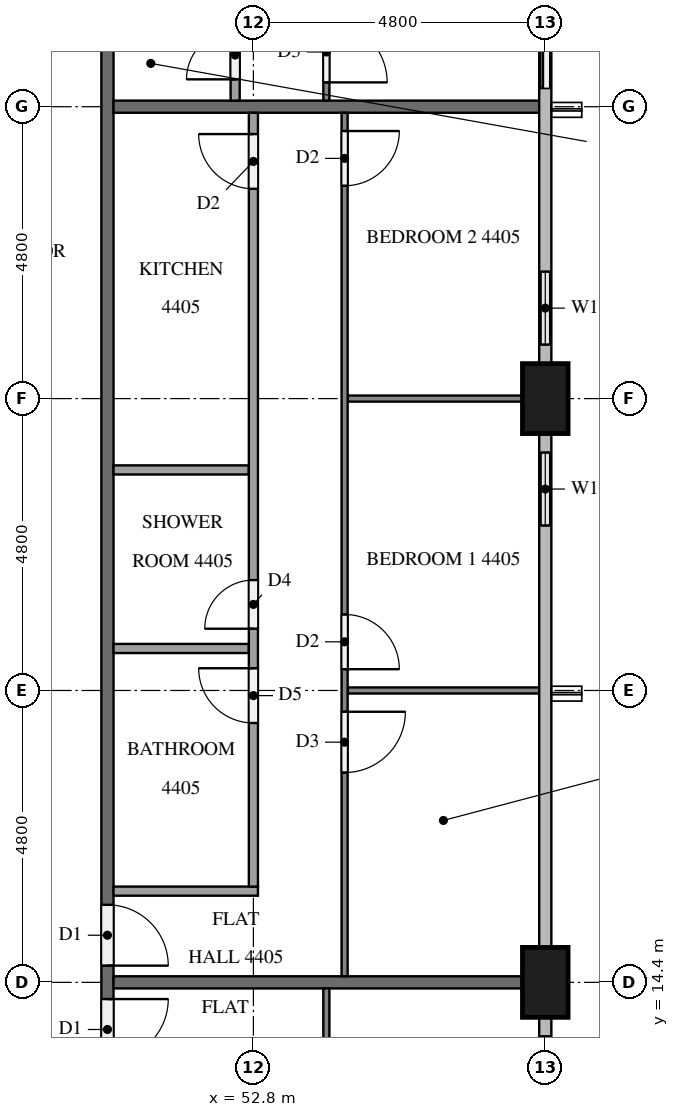
"""IFC4 building model, lengths in metres.
Left out: names, types, materials, properties, quantities, classifications, styles, units other than length and angle.
Written with IfcOpenShell. Run it as: python <this file> out.ifc"""

import sys

from ifc_helpers import new_model, si_unit, direction, frame, frame_2d, origin, origin_2d, place, context, subcontext, project, spatial, rectangle, extrude, element, fill, save


model = new_model("IFC4")
c1 = context("Model", 3, precision=1e-05, world=origin(), true_north=direction((0.0, 1.0)))
c2 = subcontext(c1, "Body", "Model", "MODEL_VIEW")
j1 = project(units=[si_unit("LENGTHUNIT", "METRE"), si_unit("PLANEANGLEUNIT", "RADIAN")], contexts=[c1])
p1 = place(None, origin())
s1 = spatial("IfcSite", under=j1, at=p1, CompositionType="ELEMENT")
p2 = place(p1, origin())
s2 = spatial("IfcBuilding", under=s1, at=p2, CompositionType="ELEMENT")
p3 = place(p2, frame((0.0, 0.0, 170.0)))
s3 = spatial("IfcBuildingStorey", under=s2, at=p3, CompositionType="ELEMENT", Elevation=170.0)
for number, where, z_axis, x_axis in (
    (1, (57.6, 14.4, 0.0), (0.0, 0.0, 1.0), (0.0, 1.0, 0.0)),
    (2, (57.6, 24.0, 0.0), (0.0, 0.0, 1.0), (0.0, 1.0, 0.0)),
):
    element("IfcColumn", number, at=place(p3, frame(where, z_axis=z_axis, x_axis=x_axis)), inside=s3, PredefinedType="COLUMN", context=c2, shape_type="SweptSolid", body=[
        extrude(rectangle(XDim=1.15, YDim=0.75, at=origin_2d()), origin(), (0.0, 0.0, 1.0), 3.1),
    ])
p4 = place(p3, frame((57.6, 12.0, 0.0), z_axis=(0.0, 0.0, 1.0), x_axis=(0.0, 1.0, 0.0)))
e3 = element("IfcWall", 3, at=p4, inside=s3, PredefinedType="SOLIDWALL", context=c2, shape_type="SweptSolid", body=[
    extrude(rectangle(XDim=1.825, YDim=0.15, at=frame_2d((0.913, 0.0))), origin(), (0.0, 0.0, 1.0), 3.1),
])
p5 = place(p4, frame((0.312, 0.0, 0.9)))
e4 = element("IfcOpeningElement", 4, at=p5, cuts=e3, PredefinedType="OPENING", context=c2, shape_type="SweptSolid", body=[
    extrude(rectangle(XDim=1.2, YDim=1.4, at=frame_2d((0.6, 0.7))), frame((0.0, 0.085, 0.0), z_axis=(0.0, -1.0, 0.0), x_axis=(1.0, 0.0, 0.0)), (0.0, 0.0, 1.0), 0.17),
])
p6 = place(p3, frame((57.6, 21.6, 0.0), z_axis=(0.0, 0.0, 1.0), x_axis=(0.0, 1.0, 0.0)))
e5 = element("IfcWall", 5, at=p6, inside=s3, PredefinedType="SOLIDWALL", context=c2, shape_type="SweptSolid", body=[
    extrude(rectangle(XDim=1.825, YDim=0.15, at=frame_2d((0.913, 0.0))), origin(), (0.0, 0.0, 1.0), 3.1),
])
p7 = place(p6, frame((0.312, 0.0, 0.9)))
e6 = element("IfcOpeningElement", 6, at=p7, cuts=e5, PredefinedType="OPENING", context=c2, shape_type="SweptSolid", body=[
    extrude(rectangle(XDim=1.2, YDim=1.4, at=frame_2d((0.6, 0.7))), frame((0.0, 0.085, 0.0), z_axis=(0.0, -1.0, 0.0), x_axis=(1.0, 0.0, 0.0)), (0.0, 0.0, 1.0), 0.17),
])
p8 = place(p3, frame((57.6, 24.575, 0.0), z_axis=(0.0, 0.0, 1.0), x_axis=(0.0, 1.0, 0.0)))
e7 = element("IfcWall", 7, at=p8, inside=s3, PredefinedType="SOLIDWALL", context=c2, shape_type="SweptSolid", body=[
    extrude(rectangle(XDim=1.825, YDim=0.15, at=frame_2d((0.913, 0.0))), origin(), (0.0, 0.0, 1.0), 3.1),
])
p9 = place(p8, frame((0.312, 0.0, 0.9)))
e8 = element("IfcOpeningElement", 8, at=p9, cuts=e7, PredefinedType="OPENING", context=c2, shape_type="SweptSolid", body=[
    extrude(rectangle(XDim=1.2, YDim=1.4, at=frame_2d((0.6, 0.7))), frame((0.0, 0.085, 0.0), z_axis=(0.0, -1.0, 0.0), x_axis=(1.0, 0.0, 0.0)), (0.0, 0.0, 1.0), 0.17),
])
p10 = place(p3, frame((57.6, 28.8, 0.0), z_axis=(0.0, 0.0, 1.0), x_axis=(0.0, 1.0, 0.0)))
e9 = element("IfcWall", 9, at=p10, inside=s3, PredefinedType="SOLIDWALL", context=c2, shape_type="SweptSolid", body=[
    extrude(rectangle(XDim=2.4, YDim=0.15, at=frame_2d((1.2, 0.0))), origin(), (0.0, 0.0, 1.0), 3.1),
])
p11 = place(p10, frame((0.3, 0.0, 0.0)))
e10 = element("IfcOpeningElement", 10, at=p11, cuts=e9, PredefinedType="OPENING", context=c2, shape_type="SweptSolid", body=[
    extrude(rectangle(XDim=1.8, YDim=2.4, at=frame_2d((0.9, 1.2))), frame((0.0, 0.085, 0.0), z_axis=(0.0, -1.0, 0.0), x_axis=(1.0, 0.0, 0.0)), (0.0, 0.0, 1.0), 0.17),
])
p12 = place(p3, frame((50.4, 40.7, 0.0), z_axis=(0.0, 0.0, 1.0), x_axis=(0.0, -1.0, 0.0)))
e11 = element("IfcWall", 11, at=p12, inside=s3, PredefinedType="PARTITIONING", context=c2, shape_type="SweptSolid", body=[
    extrude(rectangle(XDim=28.6, YDim=0.2, at=frame_2d((14.3, 0.0))), origin(), (0.0, 0.0, 1.0), 3.1),
])
p13 = place(p12, frame((26.575, 0.0, 0.0)))
e12 = element("IfcOpeningElement", 12, at=p13, cuts=e11, PredefinedType="OPENING", context=c2, shape_type="SweptSolid", body=[
    extrude(rectangle(XDim=1.0, YDim=2.1, at=frame_2d((0.5, 1.05))), frame((0.0, 0.11, 0.0), z_axis=(0.0, -1.0, 0.0), x_axis=(1.0, 0.0, 0.0)), (0.0, 0.0, 1.0), 0.22),
])
p14 = place(p12, frame((25.025, 0.0, 0.0)))
e13 = element("IfcOpeningElement", 13, at=p14, cuts=e11, PredefinedType="OPENING", context=c2, shape_type="SweptSolid", body=[
    extrude(rectangle(XDim=1.0, YDim=2.1, at=frame_2d((0.5, 1.05))), frame((0.0, 0.11, 0.0), z_axis=(0.0, -1.0, 0.0), x_axis=(1.0, 0.0, 0.0)), (0.0, 0.0, 1.0), 0.22),
])
p15 = place(p12, frame((4.975, 0.0, 0.0)))
e14 = element("IfcOpeningElement", 14, at=p15, cuts=e11, PredefinedType="OPENING", context=c2, shape_type="SweptSolid", body=[
    extrude(rectangle(XDim=1.0, YDim=2.1, at=frame_2d((0.5, 1.05))), frame((0.0, 0.11, 0.0), z_axis=(0.0, -1.0, 0.0), x_axis=(1.0, 0.0, 0.0)), (0.0, 0.0, 1.0), 0.22),
])
p16 = place(p12, frame((3.425, 0.0, 0.0)))
e15 = element("IfcOpeningElement", 15, at=p16, cuts=e11, PredefinedType="OPENING", context=c2, shape_type="SweptSolid", body=[
    extrude(rectangle(XDim=1.0, YDim=2.1, at=frame_2d((0.5, 1.05))), frame((0.0, 0.11, 0.0), z_axis=(0.0, -1.0, 0.0), x_axis=(1.0, 0.0, 0.0)), (0.0, 0.0, 1.0), 0.22),
])
p17 = place(p3, frame((50.5, 14.4, 0.0), z_axis=(0.0, 0.0, 1.0), x_axis=(1.0, 0.0, 0.0)))
e16 = element("IfcWall", 16, at=p17, inside=s3, PredefinedType="PARTITIONING", context=c2, shape_type="SweptSolid", body=[
    extrude(rectangle(XDim=6.725, YDim=0.2, at=frame_2d((3.363, 0.0))), origin(), (0.0, 0.0, 1.0), 3.1),
])
p18 = place(p3, frame((50.5, 28.8, 0.0), z_axis=(0.0, 0.0, 1.0), x_axis=(1.0, 0.0, 0.0)))
e17 = element("IfcWall", 17, at=p18, inside=s3, PredefinedType="PARTITIONING", context=c2, shape_type="SweptSolid", body=[
    extrude(rectangle(XDim=7.0, YDim=0.2, at=frame_2d((3.5, 0.0))), origin(), (0.0, 0.0, 1.0), 3.1),
])
p19 = place(p3, frame((54.0, 14.3, 0.0), z_axis=(0.0, 0.0, 1.0), x_axis=(0.0, -1.0, 0.0)))
e18 = element("IfcWall", 18, at=p19, inside=s3, PredefinedType="PARTITIONING", context=c2, shape_type="SweptSolid", body=[
    extrude(rectangle(XDim=13.879, YDim=0.1, at=frame_2d((6.939, 0.0))), origin(), (0.0, 0.0, 1.0), 3.1),
])
p20 = place(p19, frame((3.45, 0.0, 0.0)))
e19 = element("IfcOpeningElement", 19, at=p20, cuts=e18, PredefinedType="OPENING", context=c2, shape_type="SweptSolid", body=[
    extrude(rectangle(XDim=0.9, YDim=2.1, at=frame_2d((0.45, 1.05))), frame((0.0, 0.06, 0.0), z_axis=(0.0, -1.0, 0.0), x_axis=(1.0, 0.0, 0.0)), (0.0, 0.0, 1.0), 0.12),
])
p21 = place(p19, frame((5.05, 0.0, 0.0)))
e20 = element("IfcOpeningElement", 20, at=p21, cuts=e18, PredefinedType="OPENING", context=c2, shape_type="SweptSolid", body=[
    extrude(rectangle(XDim=1.0, YDim=2.1, at=frame_2d((0.5, 1.05))), frame((0.0, 0.06, 0.0), z_axis=(0.0, -1.0, 0.0), x_axis=(1.0, 0.0, 0.0)), (0.0, 0.0, 1.0), 0.12),
])
p22 = place(p19, frame((12.678, 0.0, 0.0)))
e21 = element("IfcOpeningElement", 21, at=p22, cuts=e18, PredefinedType="OPENING", context=c2, shape_type="SweptSolid", body=[
    extrude(rectangle(XDim=0.9, YDim=2.1, at=frame_2d((0.45, 1.05))), frame((0.0, 0.06, 0.0), z_axis=(0.0, -1.0, 0.0), x_axis=(1.0, 0.0, 0.0)), (0.0, 0.0, 1.0), 0.12),
])
p23 = place(p3, frame((54.35, 19.2, 0.0), z_axis=(0.0, 0.0, 1.0), x_axis=(1.0, 0.0, 0.0)))
e22 = element("IfcWall", 22, at=p23, inside=s3, PredefinedType="PARTITIONING", context=c2, shape_type="SweptSolid", body=[
    extrude(rectangle(XDim=3.15, YDim=0.1, at=frame_2d((1.575, 0.0))), origin(), (0.0, 0.0, 1.0), 3.1),
])
p24 = place(p3, frame((54.35, 24.0, 0.0), z_axis=(0.0, 0.0, 1.0), x_axis=(1.0, 0.0, 0.0)))
e23 = element("IfcWall", 23, at=p24, inside=s3, PredefinedType="PARTITIONING", context=c2, shape_type="SweptSolid", body=[
    extrude(rectangle(XDim=2.875, YDim=0.1, at=frame_2d((1.438, 0.0))), origin(), (0.0, 0.0, 1.0), 3.1),
])
p25 = place(p3, frame((54.3, 28.7, 0.0), z_axis=(0.0, 0.0, 1.0), x_axis=(0.0, -1.0, 0.0)))
e24 = element("IfcWall", 24, at=p25, inside=s3, PredefinedType="PARTITIONING", context=c2, shape_type="SweptSolid", body=[
    extrude(rectangle(XDim=14.2, YDim=0.1, at=frame_2d((7.1, 0.0))), origin(), (0.0, 0.0, 1.0), 3.1),
])
p26 = place(p25, frame((9.85, 0.0, 0.0)))
e25 = element("IfcOpeningElement", 25, at=p26, cuts=e24, PredefinedType="OPENING", context=c2, shape_type="SweptSolid", body=[
    extrude(rectangle(XDim=1.0, YDim=2.1, at=frame_2d((0.5, 1.05))), frame((0.0, 0.06, 0.0), z_axis=(0.0, -1.0, 0.0), x_axis=(1.0, 0.0, 0.0)), (0.0, 0.0, 1.0), 0.12),
])
p27 = place(p25, frame((8.25, 0.0, 0.0)))
e26 = element("IfcOpeningElement", 26, at=p27, cuts=e24, PredefinedType="OPENING", context=c2, shape_type="SweptSolid", body=[
    extrude(rectangle(XDim=0.9, YDim=2.1, at=frame_2d((0.45, 1.05))), frame((0.0, 0.06, 0.0), z_axis=(0.0, -1.0, 0.0), x_axis=(1.0, 0.0, 0.0)), (0.0, 0.0, 1.0), 0.12),
])
p28 = place(p25, frame((0.3, 0.0, 0.0)))
e27 = element("IfcOpeningElement", 27, at=p28, cuts=e24, PredefinedType="OPENING", context=c2, shape_type="SweptSolid", body=[
    extrude(rectangle(XDim=0.9, YDim=2.1, at=frame_2d((0.45, 1.05))), frame((0.0, 0.06, 0.0), z_axis=(0.0, -1.0, 0.0), x_axis=(1.0, 0.0, 0.0)), (0.0, 0.0, 1.0), 0.12),
])
for number, where, z_axis, x_axis in (
    (28, (50.5, 19.89, 0.0), (0.0, 0.0, 1.0), (1.0, 0.0, 0.0)),
    (29, (50.5, 22.827, 0.0), (0.0, 0.0, 1.0), (1.0, 0.0, 0.0)),
):
    element("IfcWall", number, at=place(p3, frame(where, z_axis=z_axis, x_axis=x_axis)), inside=s3, PredefinedType="PARTITIONING", context=c2, shape_type="SweptSolid", body=[
        extrude(rectangle(XDim=2.225, YDim=0.15, at=frame_2d((1.113, 0.0))), origin(), (0.0, 0.0, 1.0), 3.1),
    ])
p29 = place(p3, frame((50.5, 15.9, 0.0), z_axis=(0.0, 0.0, 1.0), x_axis=(1.0, 0.0, 0.0)))
e30 = element("IfcWall", 30, at=p29, inside=s3, PredefinedType="PARTITIONING", context=c2, shape_type="SweptSolid", body=[
    extrude(rectangle(XDim=2.375, YDim=0.15, at=frame_2d((1.188, 0.0))), origin(), (0.0, 0.0, 1.0), 3.1),
])
p30 = place(p3, frame((52.8, 15.975, 0.0), z_axis=(0.0, 0.0, 1.0), x_axis=(0.0, 1.0, 0.0)))
e31 = element("IfcWall", 31, at=p30, inside=s3, PredefinedType="PARTITIONING", context=c2, shape_type="SweptSolid", body=[
    extrude(rectangle(XDim=12.725, YDim=0.15, at=frame_2d((6.362, 0.0))), origin(), (0.0, 0.0, 1.0), 3.1),
])
p31 = place(p30, frame((2.69, 0.0, 0.0)))
e32 = element("IfcOpeningElement", 32, at=p31, cuts=e31, PredefinedType="OPENING", context=c2, shape_type="SweptSolid", body=[
    extrude(rectangle(XDim=0.9, YDim=2.1, at=frame_2d((0.45, 1.05))), frame((0.0, 0.085, 0.0), z_axis=(0.0, -1.0, 0.0), x_axis=(1.0, 0.0, 0.0)), (0.0, 0.0, 1.0), 0.17),
])
p32 = place(p30, frame((4.24, 0.0, 0.0)))
e33 = element("IfcOpeningElement", 33, at=p32, cuts=e31, PredefinedType="OPENING", context=c2, shape_type="SweptSolid", body=[
    extrude(rectangle(XDim=0.8, YDim=2.1, at=frame_2d((0.4, 1.05))), frame((0.0, 0.085, 0.0), z_axis=(0.0, -1.0, 0.0), x_axis=(1.0, 0.0, 0.0)), (0.0, 0.0, 1.0), 0.17),
])
p33 = place(p30, frame((11.475, 0.0, 0.0)))
e34 = element("IfcOpeningElement", 34, at=p33, cuts=e31, PredefinedType="OPENING", context=c2, shape_type="SweptSolid", body=[
    extrude(rectangle(XDim=0.9, YDim=2.1, at=frame_2d((0.45, 1.05))), frame((0.0, 0.085, 0.0), z_axis=(0.0, -1.0, 0.0), x_axis=(1.0, 0.0, 0.0)), (0.0, 0.0, 1.0), 0.17),
])
p34 = place(p3, frame((54.0, 35.9, 0.0), z_axis=(0.0, 0.0, 1.0), x_axis=(0.0, -1.0, 0.0)))
e35 = element("IfcWall", 35, at=p34, inside=s3, PredefinedType="PARTITIONING", context=c2, shape_type="SweptSolid", body=[
    extrude(rectangle(XDim=7.0, YDim=0.1, at=frame_2d((3.5, 0.0))), origin(), (0.0, 0.0, 1.0), 3.1),
])
p35 = place(p34, frame((5.7, 0.0, 0.0)))
e36 = element("IfcOpeningElement", 36, at=p35, cuts=e35, PredefinedType="OPENING", context=c2, shape_type="SweptSolid", body=[
    extrude(rectangle(XDim=1.0, YDim=2.1, at=frame_2d((0.5, 1.05))), frame((0.0, 0.06, 0.0), z_axis=(0.0, -1.0, 0.0), x_axis=(1.0, 0.0, 0.0)), (0.0, 0.0, 1.0), 0.12),
])
p36 = place(p3, frame((52.5, 28.9, 0.0), z_axis=(0.0, 0.0, 1.0), x_axis=(0.0, 1.0, 0.0)))
e37 = element("IfcWall", 37, at=p36, inside=s3, PredefinedType="PARTITIONING", context=c2, shape_type="SweptSolid", body=[
    extrude(rectangle(XDim=5.525, YDim=0.15, at=frame_2d((2.763, 0.0))), origin(), (0.0, 0.0, 1.0), 3.1),
])
p37 = place(p36, frame((4.325, 0.0, 0.0)))
e38 = element("IfcOpeningElement", 38, at=p37, cuts=e37, PredefinedType="OPENING", context=c2, shape_type="SweptSolid", body=[
    extrude(rectangle(XDim=0.9, YDim=2.1, at=frame_2d((0.45, 1.05))), frame((0.0, 0.085, 0.0), z_axis=(0.0, -1.0, 0.0), x_axis=(1.0, 0.0, 0.0)), (0.0, 0.0, 1.0), 0.17),
])
p38 = place(p36, frame((0.35, 0.0, 0.0)))
e39 = element("IfcOpeningElement", 39, at=p38, cuts=e37, PredefinedType="OPENING", context=c2, shape_type="SweptSolid", body=[
    extrude(rectangle(XDim=0.8, YDim=2.1, at=frame_2d((0.4, 1.05))), frame((0.0, 0.085, 0.0), z_axis=(0.0, -1.0, 0.0), x_axis=(1.0, 0.0, 0.0)), (0.0, 0.0, 1.0), 0.17),
])
p39 = place(p5, origin())
e40 = element("IfcWindow", 40, at=p39, inside=s3, PartitioningType="SINGLE_PANEL", PredefinedType="WINDOW", context=c2, shape_type="SweptSolid", body=[
    extrude(rectangle(XDim=1.2, YDim=1.4, at=frame_2d((0.6, 0.7))), frame((0.0, 0.03, 0.0), z_axis=(0.0, -1.0, 0.0), x_axis=(1.0, 0.0, 0.0)), (0.0, 0.0, 1.0), 0.06),
])
fill(e4, e40)
p40 = place(p7, origin())
e41 = element("IfcWindow", 41, at=p40, inside=s3, PartitioningType="SINGLE_PANEL", PredefinedType="WINDOW", context=c2, shape_type="SweptSolid", body=[
    extrude(rectangle(XDim=1.2, YDim=1.4, at=frame_2d((0.6, 0.7))), frame((0.0, 0.03, 0.0), z_axis=(0.0, -1.0, 0.0), x_axis=(1.0, 0.0, 0.0)), (0.0, 0.0, 1.0), 0.06),
])
fill(e6, e41)
p41 = place(p9, origin())
e42 = element("IfcWindow", 42, at=p41, inside=s3, PartitioningType="SINGLE_PANEL", PredefinedType="WINDOW", context=c2, shape_type="SweptSolid", body=[
    extrude(rectangle(XDim=1.2, YDim=1.4, at=frame_2d((0.6, 0.7))), frame((0.0, 0.03, 0.0), z_axis=(0.0, -1.0, 0.0), x_axis=(1.0, 0.0, 0.0)), (0.0, 0.0, 1.0), 0.06),
])
fill(e8, e42)
p42 = place(p11, origin())
e43 = element("IfcDoor", 43, at=p42, inside=s3, OperationType="SLIDING_TO_RIGHT", PredefinedType="DOOR", context=c2, shape_type="SweptSolid", body=[
    extrude(rectangle(XDim=1.8, YDim=2.4, at=frame_2d((0.9, 1.2))), frame((0.0, 0.025, 0.0), z_axis=(0.0, -1.0, 0.0), x_axis=(1.0, 0.0, 0.0)), (0.0, 0.0, 1.0), 0.05),
])
fill(e10, e43)
p43 = place(p13, origin())
e44 = element("IfcDoor", 44, at=p43, inside=s3, OperationType="SINGLE_SWING_LEFT", PredefinedType="DOOR", context=c2, shape_type="SweptSolid", body=[
    extrude(rectangle(XDim=1.0, YDim=2.1, at=frame_2d((0.5, 1.05))), frame((0.0, 0.025, 0.0), z_axis=(0.0, -1.0, 0.0), x_axis=(1.0, 0.0, 0.0)), (0.0, 0.0, 1.0), 0.05),
])
fill(e12, e44)
p44 = place(p14, origin())
e45 = element("IfcDoor", 45, at=p44, inside=s3, OperationType="SINGLE_SWING_RIGHT", PredefinedType="DOOR", context=c2, shape_type="SweptSolid", body=[
    extrude(rectangle(XDim=1.0, YDim=2.1, at=frame_2d((0.5, 1.05))), frame((0.0, 0.025, 0.0), z_axis=(0.0, -1.0, 0.0), x_axis=(1.0, 0.0, 0.0)), (0.0, 0.0, 1.0), 0.05),
])
fill(e13, e45)
p45 = place(p26, origin())
e46 = element("IfcDoor", 46, at=p45, inside=s3, OperationType="SINGLE_SWING_LEFT", PredefinedType="DOOR", context=c2, shape_type="SweptSolid", body=[
    extrude(rectangle(XDim=1.0, YDim=2.1, at=frame_2d((0.5, 1.05))), frame((0.0, 0.025, 0.0), z_axis=(0.0, -1.0, 0.0), x_axis=(1.0, 0.0, 0.0)), (0.0, 0.0, 1.0), 0.05),
])
fill(e25, e46)
p46 = place(p27, origin())
e47 = element("IfcDoor", 47, at=p46, inside=s3, OperationType="SINGLE_SWING_RIGHT", PredefinedType="DOOR", context=c2, shape_type="SweptSolid", body=[
    extrude(rectangle(XDim=0.9, YDim=2.1, at=frame_2d((0.45, 1.05))), frame((0.0, 0.025, 0.0), z_axis=(0.0, -1.0, 0.0), x_axis=(1.0, 0.0, 0.0)), (0.0, 0.0, 1.0), 0.05),
])
fill(e26, e47)
p47 = place(p28, origin())
e48 = element("IfcDoor", 48, at=p47, inside=s3, OperationType="SINGLE_SWING_LEFT", PredefinedType="DOOR", context=c2, shape_type="SweptSolid", body=[
    extrude(rectangle(XDim=0.9, YDim=2.1, at=frame_2d((0.45, 1.05))), frame((0.0, 0.025, 0.0), z_axis=(0.0, -1.0, 0.0), x_axis=(1.0, 0.0, 0.0)), (0.0, 0.0, 1.0), 0.05),
])
fill(e27, e48)
p48 = place(p31, origin())
e49 = element("IfcDoor", 49, at=p48, inside=s3, OperationType="SINGLE_SWING_RIGHT", PredefinedType="DOOR", context=c2, shape_type="SweptSolid", body=[
    extrude(rectangle(XDim=0.9, YDim=2.1, at=frame_2d((0.45, 1.05))), frame((0.0, 0.025, 0.0), z_axis=(0.0, -1.0, 0.0), x_axis=(1.0, 0.0, 0.0)), (0.0, 0.0, 1.0), 0.05),
])
fill(e32, e49)
p49 = place(p32, origin())
e50 = element("IfcDoor", 50, at=p49, inside=s3, OperationType="SINGLE_SWING_LEFT", PredefinedType="DOOR", context=c2, shape_type="SweptSolid", body=[
    extrude(rectangle(XDim=0.8, YDim=2.1, at=frame_2d((0.4, 1.05))), frame((0.0, 0.025, 0.0), z_axis=(0.0, -1.0, 0.0), x_axis=(1.0, 0.0, 0.0)), (0.0, 0.0, 1.0), 0.05),
])
fill(e33, e50)
p50 = place(p33, origin())
e51 = element("IfcDoor", 51, at=p50, inside=s3, OperationType="SINGLE_SWING_RIGHT", PredefinedType="DOOR", context=c2, shape_type="SweptSolid", body=[
    extrude(rectangle(XDim=0.9, YDim=2.1, at=frame_2d((0.45, 1.05))), frame((0.0, 0.025, 0.0), z_axis=(0.0, -1.0, 0.0), x_axis=(1.0, 0.0, 0.0)), (0.0, 0.0, 1.0), 0.05),
])
fill(e34, e51)
p51 = place(p35, origin())
e52 = element("IfcDoor", 52, at=p51, inside=s3, OperationType="SINGLE_SWING_RIGHT", PredefinedType="DOOR", context=c2, shape_type="SweptSolid", body=[
    extrude(rectangle(XDim=1.0, YDim=2.1, at=frame_2d((0.5, 1.05))), frame((0.0, 0.025, 0.0), z_axis=(0.0, -1.0, 0.0), x_axis=(1.0, 0.0, 0.0)), (0.0, 0.0, 1.0), 0.05),
])
fill(e36, e52)
p52 = place(p38, origin())
e53 = element("IfcDoor", 53, at=p52, inside=s3, OperationType="SINGLE_SWING_LEFT", PredefinedType="DOOR", context=c2, shape_type="SweptSolid", body=[
    extrude(rectangle(XDim=0.8, YDim=2.1, at=frame_2d((0.4, 1.05))), frame((0.0, 0.025, 0.0), z_axis=(0.0, -1.0, 0.0), x_axis=(1.0, 0.0, 0.0)), (0.0, 0.0, 1.0), 0.05),
])
fill(e39, e53)
save(model, sys.argv[1])
